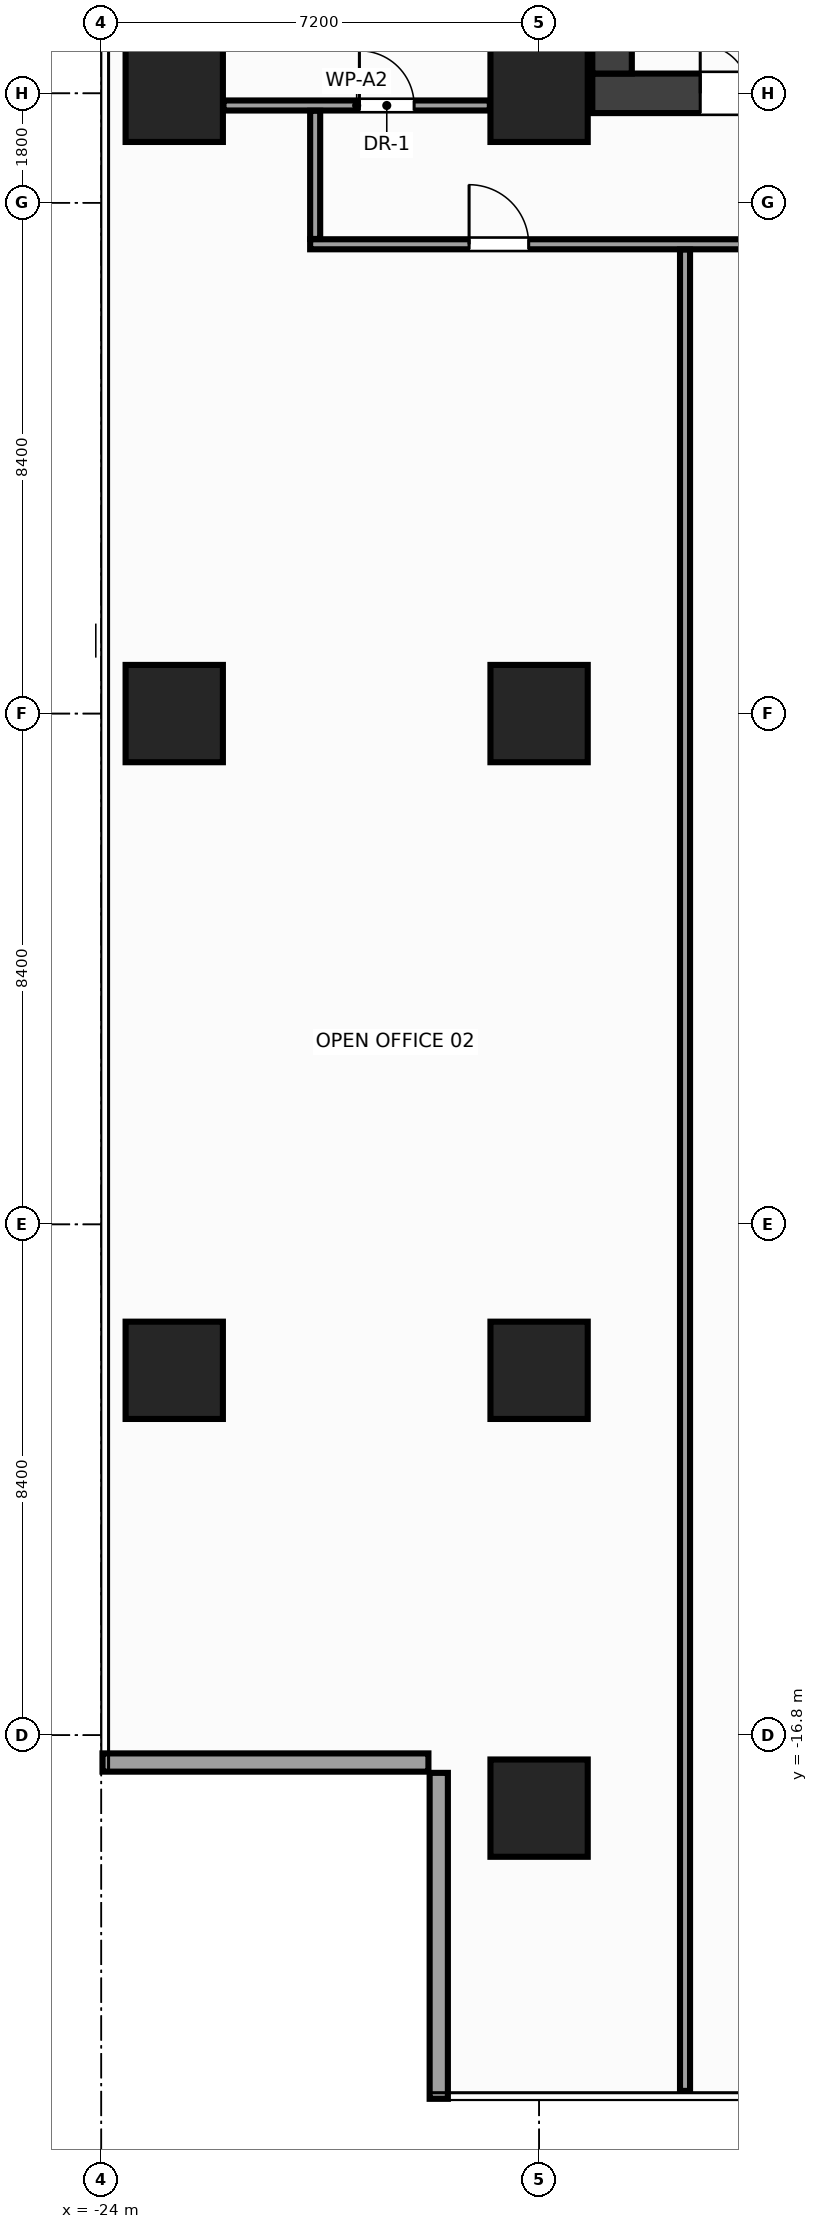
"""IFC4 building model, lengths in metres.
Left out: names, types, materials, properties, quantities, classifications, styles, units other than length and angle.
Written with IfcOpenShell. Run it as: python <this file> out.ifc"""

import sys

from ifc_helpers import new_model, si_unit, direction, frame, frame_2d, origin, origin_2d, place, context, subcontext, project, spatial, rectangle, extrude, source, transform, mapped, element, fill, save


model = new_model("IFC4")
c1 = context("Model", 3, precision=1e-05, world=origin(), true_north=direction((0.0, 1.0)))
c2 = subcontext(c1, "Body", "Model", "MODEL_VIEW")
j1 = project(units=[si_unit("LENGTHUNIT", "METRE"), si_unit("PLANEANGLEUNIT", "RADIAN")], contexts=[c1])
p1 = place(None, origin())
s1 = spatial("IfcSite", under=j1, at=p1, CompositionType="ELEMENT")
p2 = place(p1, origin())
s2 = spatial("IfcBuilding", under=s1, at=p2, CompositionType="ELEMENT")
p3 = place(p2, frame((0.0, 0.0, 156.8)))
s3 = spatial("IfcBuildingStorey", under=s2, at=p3, CompositionType="ELEMENT", Elevation=156.8)
m1 = source(origin(), c2, "Body", "SweptSolid", [
    extrude(rectangle(XDim=31.85, YDim=0.65, at=frame_2d((15.925, 0.0))), origin(), (0.0, 0.0, 1.0), 3.6),
])
p4 = place(p3, frame((-15.925, 10.2, 0.0), z_axis=(0.0, 0.0, 1.0), x_axis=(1.0, 0.0, 0.0)))
e1 = element("IfcWall", 1, at=p4, inside=s3, PredefinedType="SHEAR", context=c2, shape_type="MappedRepresentation", body=[
    mapped(m1, transform((0.0, 0.0, 0.0), x_axis=(1.0, 0.0, 0.0), y_axis=(0.0, 1.0, 0.0), z_axis=(0.0, 0.0, 1.0), scale=1.0)),
])
p5 = place(p4, frame((1.775, 0.0, 0.0)))
e2 = element("IfcOpeningElement", 2, at=p5, cuts=e1, PredefinedType="OPENING", context=c2, shape_type="SweptSolid", body=[
    extrude(rectangle(XDim=1.6, YDim=2.15, at=frame_2d((0.8, 1.075))), frame((0.0, 0.337, 0.0), z_axis=(0.0, -1.0, 0.0), x_axis=(1.0, 0.0, 0.0)), (0.0, 0.0, 1.0), 0.674),
])
p6 = place(p4, frame((28.475, 0.0, 0.0)))
e3 = element("IfcOpeningElement", 3, at=p6, cuts=e1, PredefinedType="OPENING", context=c2, shape_type="SweptSolid", body=[
    extrude(rectangle(XDim=1.6, YDim=2.15, at=frame_2d((0.8, 1.075))), frame((0.0, 0.337, 0.0), z_axis=(0.0, -1.0, 0.0), x_axis=(1.0, 0.0, 0.0)), (0.0, 0.0, 1.0), 0.674),
])
p7 = place(p4, frame((15.175, 0.0, 0.0)))
e4 = element("IfcOpeningElement", 4, at=p7, cuts=e1, PredefinedType="OPENING", context=c2, shape_type="SweptSolid", body=[
    extrude(rectangle(XDim=1.5, YDim=2.2, at=frame_2d((0.75, 1.1))), frame((0.0, 0.337, 0.0), z_axis=(0.0, -1.0, 0.0), x_axis=(1.0, 0.0, 0.0)), (0.0, 0.0, 1.0), 0.674),
])
m2 = source(origin(), c2, "Body", "SweptSolid", [
    extrude(rectangle(XDim=12.95, YDim=0.65, at=frame_2d((6.475, 0.0))), origin(), (0.0, 0.0, 1.0), 3.6),
])
p8 = place(p3, frame((-15.6, 10.525, 0.0), z_axis=(0.0, 0.0, 1.0), x_axis=(0.0, 1.0, 0.0)))
e5 = element("IfcWall", 5, at=p8, inside=s3, PredefinedType="SHEAR", context=c2, shape_type="MappedRepresentation", body=[
    mapped(m2, transform((0.0, 0.0, 0.0), x_axis=(1.0, 0.0, 0.0), y_axis=(0.0, 1.0, 0.0), z_axis=(0.0, 0.0, 1.0), scale=1.0)),
])
m3 = source(origin(), c2, "Body", "SweptSolid", [
    extrude(rectangle(XDim=1.6, YDim=1.6, at=origin_2d()), origin(), (0.0, 0.0, 1.0), 3.6),
])
for number, where, z_axis, x_axis in (
    (6, (-16.8, -18.0, 0.0), (0.0, 0.0, 1.0), (1.0, 0.0, 0.0)),
    (7, (-16.8, -10.8, 0.0), (0.0, 0.0, 1.0), (1.0, 0.0, 0.0)),
    (8, (-16.8, 0.0, 0.0), (0.0, 0.0, 1.0), (1.0, 0.0, 0.0)),
    (9, (-16.8, 10.2, 0.0), (0.0, 0.0, 1.0), (1.0, 0.0, 0.0)),
    (10, (-22.8, -10.8, 0.0), (0.0, 0.0, 1.0), (1.0, 0.0, 0.0)),
    (11, (-22.8, 0.0, 0.0), (0.0, 0.0, 1.0), (1.0, 0.0, 0.0)),
    (12, (-22.8, 10.2, 0.0), (0.0, 0.0, 1.0), (1.0, 0.0, 0.0)),
):
    element("IfcColumn", number, at=place(p3, frame(where, z_axis=z_axis, x_axis=x_axis)), inside=s3, PredefinedType="COLUMN", context=c2, shape_type="MappedRepresentation", body=[
        mapped(m3, transform((0.0, 0.0, 0.0), x_axis=(1.0, 0.0, 0.0), y_axis=(0.0, 1.0, 0.0), z_axis=(0.0, 0.0, 1.0), scale=1.0)),
    ])
m4 = source(origin(), c2, "Body", "SweptSolid", [
    extrude(rectangle(XDim=5.36, YDim=0.3, at=frame_2d((2.68, 0.0))), origin(), (0.0, 0.0, 1.0), 2.76),
])
p9 = place(p3, frame((-23.98, -17.25, 0.0), z_axis=(0.0, 0.0, 1.0), x_axis=(1.0, 0.0, 0.0)))
e13 = element("IfcWall", 13, at=p9, inside=s3, PredefinedType="STANDARD", context=c2, shape_type="MappedRepresentation", body=[
    mapped(m4, transform((0.0, 0.0, 0.0), x_axis=(1.0, 0.0, 0.0), y_axis=(0.0, 1.0, 0.0), z_axis=(0.0, 0.0, 1.0), scale=1.0)),
])
m5 = source(origin(), c2, "Body", "SweptSolid", [
    extrude(rectangle(XDim=5.36, YDim=0.3, at=frame_2d((2.68, 0.0))), origin(), (0.0, 0.0, 1.0), 2.76),
])
p10 = place(p3, frame((-18.45, -17.42, 0.0), z_axis=(0.0, 0.0, 1.0), x_axis=(0.0, -1.0, 0.0)))
e14 = element("IfcWall", 14, at=p10, inside=s3, PredefinedType="STANDARD", context=c2, shape_type="MappedRepresentation", body=[
    mapped(m5, transform((0.0, 0.0, 0.0), x_axis=(1.0, 0.0, 0.0), y_axis=(0.0, 1.0, 0.0), z_axis=(0.0, 0.0, 1.0), scale=1.0)),
])
m6 = source(origin(), c2, "Body", "SweptSolid", [
    extrude(rectangle(XDim=4.38, YDim=0.165, at=frame_2d((2.19, 0.0))), origin(), (0.0, 0.0, 1.0), 2.915),
])
p11 = place(p3, frame((-21.99, 10.0, 0.0), z_axis=(0.0, 0.0, 1.0), x_axis=(1.0, 0.0, 0.0)))
e15 = element("IfcWall", 15, at=p11, inside=s3, PredefinedType="PARTITIONING", context=c2, shape_type="MappedRepresentation", body=[
    mapped(m6, transform((0.0, 0.0, 0.0), x_axis=(1.0, 0.0, 0.0), y_axis=(0.0, 1.0, 0.0), z_axis=(0.0, 0.0, 1.0), scale=1.0)),
])
p12 = place(p11, frame((2.235, 0.0, 0.0)))
e16 = element("IfcOpeningElement", 16, at=p12, cuts=e15, PredefinedType="OPENING", context=c2, shape_type="SweptSolid", body=[
    extrude(rectangle(XDim=0.9, YDim=2.15, at=frame_2d((0.45, 1.075))), frame((0.0, 0.094, 0.0), z_axis=(0.0, -1.0, 0.0), x_axis=(1.0, 0.0, 0.0)), (0.0, 0.0, 1.0), 0.189),
])
m7 = source(origin(), c2, "Body", "SweptSolid", [
    extrude(rectangle(XDim=31.6, YDim=0.165, at=frame_2d((15.8, 0.0))), origin(), (0.0, 0.0, 1.0), 2.765),
])
p13 = place(p3, frame((-20.565, 7.718, 0.0), z_axis=(0.0, 0.0, 1.0), x_axis=(1.0, 0.0, 0.0)))
e17 = element("IfcWall", 17, at=p13, inside=s3, PredefinedType="PARTITIONING", context=c2, shape_type="MappedRepresentation", body=[
    mapped(m7, transform((0.0, 0.0, 0.0), x_axis=(1.0, 0.0, 0.0), y_axis=(0.0, 1.0, 0.0), z_axis=(0.0, 0.0, 1.0), scale=1.0)),
])
p14 = place(p13, frame((2.614, 0.0, 0.0)))
e18 = element("IfcOpeningElement", 18, at=p14, cuts=e17, PredefinedType="OPENING", context=c2, shape_type="SweptSolid", body=[
    extrude(rectangle(XDim=0.98, YDim=2.15, at=frame_2d((0.49, 1.075))), frame((0.0, 0.094, 0.0), z_axis=(0.0, -1.0, 0.0), x_axis=(1.0, 0.0, 0.0)), (0.0, 0.0, 1.0), 0.189),
])
p15 = place(p13, frame((15.175, 0.0, 0.0)))
e19 = element("IfcOpeningElement", 19, at=p15, cuts=e17, PredefinedType="OPENING", context=c2, shape_type="SweptSolid", body=[
    extrude(rectangle(XDim=0.98, YDim=2.15, at=frame_2d((0.49, 1.075))), frame((0.0, 0.094, 0.0), z_axis=(0.0, -1.0, 0.0), x_axis=(1.0, 0.0, 0.0)), (0.0, 0.0, 1.0), 0.189),
])
p16 = place(p13, frame((27.874, 0.0, 0.0)))
e20 = element("IfcOpeningElement", 20, at=p16, cuts=e17, PredefinedType="OPENING", context=c2, shape_type="SweptSolid", body=[
    extrude(rectangle(XDim=0.98, YDim=2.15, at=frame_2d((0.49, 1.075))), frame((0.0, 0.094, 0.0), z_axis=(0.0, -1.0, 0.0), x_axis=(1.0, 0.0, 0.0)), (0.0, 0.0, 1.0), 0.189),
])
m8 = source(origin(), c2, "Body", "SweptSolid", [
    extrude(rectangle(XDim=2.108, YDim=0.165, at=frame_2d((1.054, 0.0))), origin(), (0.0, 0.0, 1.0), 3.38),
])
p17 = place(p3, frame((-20.482, 7.805, 0.0), z_axis=(0.0, 0.0, 1.0), x_axis=(0.0, 1.0, 0.0)))
e21 = element("IfcWall", 21, at=p17, inside=s3, PredefinedType="PARTITIONING", context=c2, shape_type="MappedRepresentation", body=[
    mapped(m8, transform((0.0, 0.0, 0.0), x_axis=(1.0, 0.0, 0.0), y_axis=(0.0, 1.0, 0.0), z_axis=(0.0, 0.0, 1.0), scale=1.0)),
])
m9 = source(origin(), c2, "Body", "SweptSolid", [
    extrude(rectangle(XDim=30.28, YDim=0.165, at=frame_2d((15.14, 0.0))), origin(), (0.0, 0.0, 1.0), 2.665),
])
p18 = place(p3, frame((-14.4, -22.65, 0.0), z_axis=(0.0, 0.0, 1.0), x_axis=(0.0, 1.0, 0.0)))
e22 = element("IfcWall", 22, at=p18, inside=s3, PredefinedType="PARTITIONING", context=c2, shape_type="MappedRepresentation", body=[
    mapped(m9, transform((0.0, 0.0, 0.0), x_axis=(1.0, 0.0, 0.0), y_axis=(0.0, 1.0, 0.0), z_axis=(0.0, 0.0, 1.0), scale=1.0)),
])
m10 = source(origin(), c2, "Body", "SweptSolid", [
    extrude(rectangle(XDim=1.6, YDim=2.15, at=frame_2d((0.8, 1.075))), frame((0.0, 0.025, 0.0), z_axis=(0.0, -1.0, 0.0), x_axis=(1.0, 0.0, 0.0)), (0.0, 0.0, 1.0), 0.05),
])
p19 = place(p5, origin())
e23 = element("IfcDoor", 23, at=p19, inside=s3, OperationType="DOUBLE_DOOR_SINGLE_SWING", PredefinedType="DOOR", context=c2, shape_type="MappedRepresentation", body=[
    mapped(m10, transform((0.0, 0.0, 0.0), x_axis=(1.0, 0.0, 0.0), y_axis=(0.0, 1.0, 0.0), z_axis=(0.0, 0.0, 1.0), scale=1.0)),
])
fill(e2, e23)
m11 = source(origin(), c2, "Body", "SweptSolid", [
    extrude(rectangle(XDim=0.9, YDim=2.15, at=frame_2d((0.45, 1.075))), frame((0.0, 0.025, 0.0), z_axis=(0.0, -1.0, 0.0), x_axis=(1.0, 0.0, 0.0)), (0.0, 0.0, 1.0), 0.05),
])
p20 = place(p12, origin())
e24 = element("IfcDoor", 24, at=p20, inside=s3, OperationType="SINGLE_SWING_LEFT", PredefinedType="DOOR", context=c2, shape_type="MappedRepresentation", body=[
    mapped(m11, transform((0.0, 0.0, 0.0), x_axis=(1.0, 0.0, 0.0), y_axis=(0.0, 1.0, 0.0), z_axis=(0.0, 0.0, 1.0), scale=1.0)),
])
fill(e16, e24)
m12 = source(origin(), c2, "Body", "SweptSolid", [
    extrude(rectangle(XDim=0.98, YDim=2.15, at=frame_2d((0.49, 1.075))), frame((0.0, 0.025, 0.0), z_axis=(0.0, -1.0, 0.0), x_axis=(1.0, 0.0, 0.0)), (0.0, 0.0, 1.0), 0.05),
])
p21 = place(p14, origin())
e25 = element("IfcDoor", 25, at=p21, inside=s3, OperationType="SINGLE_SWING_LEFT", PredefinedType="DOOR", context=c2, shape_type="MappedRepresentation", body=[
    mapped(m12, transform((0.0, 0.0, 0.0), x_axis=(1.0, 0.0, 0.0), y_axis=(0.0, 1.0, 0.0), z_axis=(0.0, 0.0, 1.0), scale=1.0)),
])
fill(e18, e25)
save(model, sys.argv[1])
